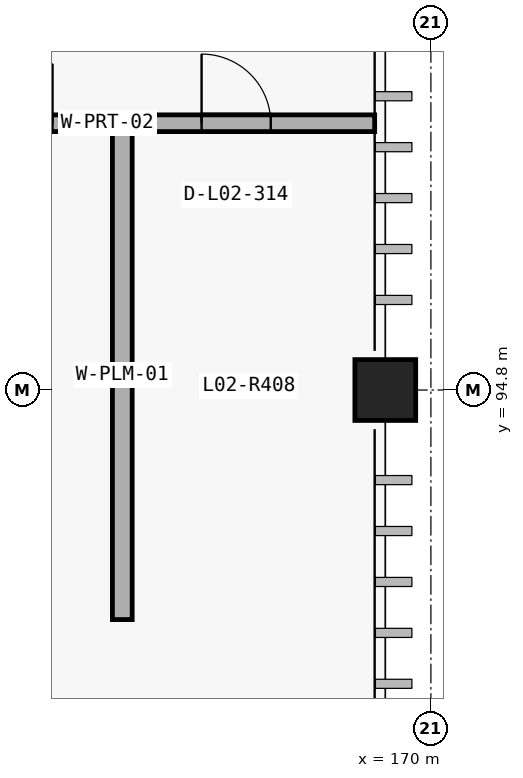
"""IFC4 building model, lengths in metres.
Left out: names, types, materials, properties, quantities, classifications, styles, units other than length and angle.
Written with IfcOpenShell. Run it as: python <this file> out.ifc"""

import sys

from ifc_helpers import new_model, si_unit, direction, frame, frame_2d, origin_with_axes, origin_2d_with_axis, place, context, subcontext, project, spatial, rectangle, circle, extrude, element, fill, save


model = new_model("IFC4")
c1 = context("Model", 3, precision=1e-05, world=origin_with_axes(), true_north=direction((0.0, 1.0)))
c2 = subcontext(c1, "Body", "Model", "MODEL_VIEW")
j1 = project(units=[si_unit("LENGTHUNIT", "METRE"), si_unit("PLANEANGLEUNIT", "RADIAN")], contexts=[c1])
p1 = place(None, origin_with_axes())
s1 = spatial("IfcSite", under=j1, at=p1, CompositionType="ELEMENT")
p2 = place(p1, origin_with_axes())
s2 = spatial("IfcBuilding", under=s1, at=p2, CompositionType="ELEMENT")
p3 = place(p2, frame((0.0, 0.0, 10.8), z_axis=(0.0, 0.0, 1.0), x_axis=(1.0, 0.0, 0.0)))
s3 = spatial("IfcBuildingStorey", under=s2, at=p3, CompositionType="ELEMENT", Elevation=10.8)
p4 = place(None, frame((162.22, 98.31, 10.8), z_axis=(0.0, 0.0, 1.0), x_axis=(1.0, 0.0, 0.0)))
e1 = element("IfcWall", 1, at=p4, inside=s3, PredefinedType="PARTITIONING", context=c2, shape_type="SweptSolid", body=[
    extrude(rectangle(XDim=7.04, YDim=0.22, at=frame_2d((3.52, 0.0), x_axis=(1.0, 0.0))), origin_with_axes(), (0.0, 0.0, 1.0), 4.44),
])
p5 = place(None, frame((164.242, 98.31, 10.8), z_axis=(0.0, 0.0, 1.0), x_axis=(1.0, 0.0, 0.0)))
e2 = element("IfcOpeningElement", 2, at=p5, cuts=e1, PredefinedType="OPENING", context=c2, shape_type="SweptSolid", body=[
    extrude(rectangle(XDim=1.56, YDim=2.28, at=frame_2d((0.0, 1.14), x_axis=(1.0, 0.0))), frame((0.0, 0.12, 0.0), z_axis=(0.0, -1.0, 0.0), x_axis=(1.0, 0.0, 0.0)), (0.0, 0.0, 1.0), 0.24),
])
p6 = place(None, frame((167.438, 98.31, 10.8), z_axis=(0.0, 0.0, 1.0), x_axis=(1.0, 0.0, 0.0)))
e3 = element("IfcOpeningElement", 3, at=p6, cuts=e1, PredefinedType="OPENING", context=c2, shape_type="SweptSolid", body=[
    extrude(rectangle(XDim=0.91, YDim=2.12, at=frame_2d((0.0, 1.06), x_axis=(1.0, 0.0))), frame((0.0, 0.12, 0.0), z_axis=(0.0, -1.0, 0.0), x_axis=(1.0, 0.0, 0.0)), (0.0, 0.0, 1.0), 0.24),
])
p7 = place(None, frame((165.94, 91.78, 10.8), z_axis=(0.0, 0.0, 1.0), x_axis=(0.0, 1.0, 0.0)))
e4 = element("IfcWall", 4, at=p7, inside=s3, PredefinedType="PLUMBINGWALL", context=c2, shape_type="SweptSolid", body=[
    extrude(rectangle(XDim=6.43, YDim=0.26, at=frame_2d((3.215, 0.0), x_axis=(1.0, 0.0))), origin_with_axes(), (0.0, 0.0, 1.0), 4.44),
])
p8 = place(None, frame((169.4, 94.8, 10.8), z_axis=(0.0, 0.0, 1.0), x_axis=(1.0, 0.0, 0.0)))
e5 = element("IfcColumn", 5, at=p8, inside=s3, PredefinedType="COLUMN", context=c2, shape_type="SweptSolid", body=[
    extrude(circle(Radius=0.4, at=origin_2d_with_axis()), origin_with_axes(), (0.0, 0.0, 1.0), 4.8),
])
p9 = place(None, frame((167.438, 98.31, 10.8), z_axis=(0.0, 0.0, 1.0), x_axis=(1.0, 0.0, 0.0)))
e6 = element("IfcDoor", 6, at=p9, inside=s3, OperationType="SINGLE_SWING_LEFT", PredefinedType="DOOR", context=c2, shape_type="SweptSolid", body=[
    extrude(rectangle(XDim=0.91, YDim=2.12, at=frame_2d((0.0, 1.06), x_axis=(1.0, 0.0))), frame((0.0, 0.04, 0.0), z_axis=(0.0, -1.0, 0.0), x_axis=(1.0, 0.0, 0.0)), (0.0, 0.0, 1.0), 0.08),
])
fill(e3, e6)
save(model, sys.argv[1])
